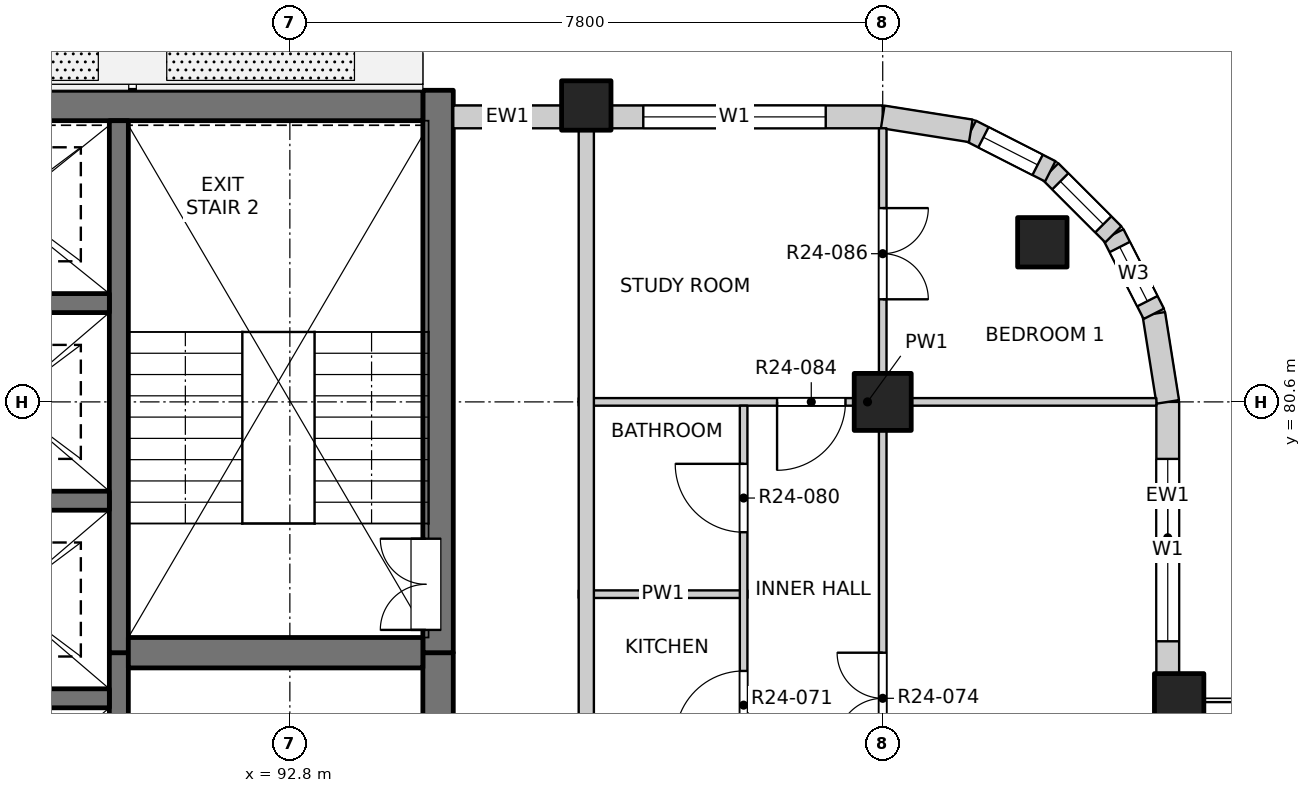
"""IFC4 building model, lengths in metres.
Left out: names, types, materials, properties, quantities, classifications, styles, units other than length and angle.
Written with IfcOpenShell. Run it as: python <this file> out.ifc"""

import sys

from ifc_helpers import new_model, si_unit, direction, frame, frame_2d, origin, origin_2d, place, context, subcontext, project, spatial, rectangle, extrude, element, fill, save


model = new_model("IFC4")
c1 = context("Model", 3, precision=1e-05, world=origin(), true_north=direction((0.0, 1.0)))
c2 = subcontext(c1, "Body", "Model", "MODEL_VIEW")
j1 = project(units=[si_unit("LENGTHUNIT", "METRE"), si_unit("PLANEANGLEUNIT", "RADIAN")], contexts=[c1])
p1 = place(None, origin())
s1 = spatial("IfcSite", under=j1, at=p1, CompositionType="ELEMENT")
p2 = place(p1, origin())
s2 = spatial("IfcBuilding", under=s1, at=p2, CompositionType="ELEMENT")
p3 = place(p2, frame((0.0, 0.0, 246.0)))
s3 = spatial("IfcBuildingStorey", under=s2, at=p3, CompositionType="ELEMENT", Elevation=246.0)
for number, where, z_axis, x_axis in (
    (1, (102.7, 82.7, -0.3), (0.0, 0.0, 1.0), (1.0, 0.0, 0.0)),
    (2, (104.5, 76.7, -0.3), (0.0, 0.0, 1.0), (1.0, 0.0, 0.0)),
    (3, (96.7, 84.5, -0.3), (0.0, 0.0, 1.0), (1.0, 0.0, 0.0)),
):
    element("IfcColumn", number, at=place(p3, frame(where, z_axis=z_axis, x_axis=x_axis)), inside=s3, PredefinedType="COLUMN", context=c2, shape_type="SweptSolid", body=[
        extrude(rectangle(XDim=0.65, YDim=0.65, at=origin_2d()), origin(), (0.0, 0.0, 1.0), 3.45),
    ])
p4 = place(p3, frame((100.6, 80.6, -0.3), z_axis=(0.0, 0.0, 1.0), x_axis=(1.0, 0.0, 0.0)))
e4 = element("IfcColumn", 4, at=p4, inside=s3, PredefinedType="COLUMN", context=c2, shape_type="SweptSolid", body=[
    extrude(rectangle(XDim=0.75, YDim=0.75, at=origin_2d()), origin(), (0.0, 0.0, 1.0), 3.45),
])
p5 = place(p3, frame((94.75, 61.95, -0.3), z_axis=(0.0, 0.0, 1.0), x_axis=(0.0, 1.0, 0.0)))
e5 = element("IfcWall", 5, at=p5, inside=s3, PredefinedType="SOLIDWALL", context=c2, shape_type="SweptSolid", body=[
    extrude(rectangle(XDim=15.35, YDim=0.4, at=frame_2d((7.675, 0.0))), origin(), (0.0, 0.0, 1.0), 3.45),
])
p6 = place(p5, frame((0.925, 0.0, 0.3)))
e6 = element("IfcOpeningElement", 6, at=p6, cuts=e5, PredefinedType="OPENING", context=c2, shape_type="SweptSolid", body=[
    extrude(rectangle(XDim=0.9, YDim=2.1, at=frame_2d((0.45, 1.05))), frame((0.0, 0.21, 0.0), z_axis=(0.0, -1.0, 0.0), x_axis=(1.0, 0.0, 0.0)), (0.0, 0.0, 1.0), 0.42),
])
p7 = place(p5, frame((3.8, 0.0, 0.3)))
e7 = element("IfcOpeningElement", 7, at=p7, cuts=e5, PredefinedType="OPENING", context=c2, shape_type="SweptSolid", body=[
    extrude(rectangle(XDim=0.9, YDim=2.1, at=frame_2d((0.45, 1.05))), frame((0.0, 0.21, 0.0), z_axis=(0.0, -1.0, 0.0), x_axis=(1.0, 0.0, 0.0)), (0.0, 0.0, 1.0), 0.42),
])
p8 = place(p5, frame((6.8, 0.0, 0.3)))
e8 = element("IfcOpeningElement", 8, at=p8, cuts=e5, PredefinedType="OPENING", context=c2, shape_type="SweptSolid", body=[
    extrude(rectangle(XDim=0.9, YDim=2.1, at=frame_2d((0.45, 1.05))), frame((0.0, 0.21, 0.0), z_axis=(0.0, -1.0, 0.0), x_axis=(1.0, 0.0, 0.0)), (0.0, 0.0, 1.0), 0.42),
])
p9 = place(p5, frame((9.8, 0.0, 0.3)))
e9 = element("IfcOpeningElement", 9, at=p9, cuts=e5, PredefinedType="OPENING", context=c2, shape_type="SweptSolid", body=[
    extrude(rectangle(XDim=0.9, YDim=2.1, at=frame_2d((0.45, 1.05))), frame((0.0, 0.21, 0.0), z_axis=(0.0, -1.0, 0.0), x_axis=(1.0, 0.0, 0.0)), (0.0, 0.0, 1.0), 0.42),
])
p10 = place(p5, frame((13.1, 0.0, 0.3)))
e10 = element("IfcOpeningElement", 10, at=p10, cuts=e5, PredefinedType="OPENING", context=c2, shape_type="SweptSolid", body=[
    extrude(rectangle(XDim=0.9, YDim=2.1, at=frame_2d((0.45, 1.05))), frame((0.0, 0.21, 0.0), z_axis=(0.0, -1.0, 0.0), x_axis=(1.0, 0.0, 0.0)), (0.0, 0.0, 1.0), 0.42),
])
p11 = place(p3, frame((94.75, 77.3, -0.3), z_axis=(0.0, 0.0, 1.0), x_axis=(0.0, 1.0, 0.0)))
e11 = element("IfcWall", 11, at=p11, inside=s3, PredefinedType="SOLIDWALL", context=c2, shape_type="SweptSolid", body=[
    extrude(rectangle(XDim=7.4, YDim=0.4, at=frame_2d((3.7, 0.0))), origin(), (0.0, 0.0, 1.0), 3.45),
])
p12 = place(p11, frame((0.3, 0.0, 0.3)))
e12 = element("IfcOpeningElement", 12, at=p12, cuts=e11, PredefinedType="OPENING", context=c2, shape_type="SweptSolid", body=[
    extrude(rectangle(XDim=1.2, YDim=2.1, at=frame_2d((0.6, 1.05))), frame((0.0, 0.21, 0.0), z_axis=(0.0, -1.0, 0.0), x_axis=(1.0, 0.0, 0.0)), (0.0, 0.0, 1.0), 0.42),
])
p13 = place(p3, frame((75.45, 84.5, -0.3), z_axis=(0.0, 0.0, 1.0), x_axis=(1.0, 0.0, 0.0)))
e13 = element("IfcWall", 13, at=p13, inside=s3, PredefinedType="SOLIDWALL", context=c2, shape_type="SweptSolid", body=[
    extrude(rectangle(XDim=19.1, YDim=0.4, at=frame_2d((9.55, 0.0))), origin(), (0.0, 0.0, 1.0), 3.45),
])
p14 = place(p3, frame((90.55, 61.95, -0.3), z_axis=(0.0, 0.0, 1.0), x_axis=(0.0, 1.0, 0.0)))
e14 = element("IfcWall", 14, at=p14, inside=s3, PredefinedType="SOLIDWALL", context=c2, shape_type="SweptSolid", body=[
    extrude(rectangle(XDim=15.35, YDim=0.25, at=frame_2d((7.675, 0.0))), origin(), (0.0, 0.0, 1.0), 3.45),
])
p15 = place(p3, frame((90.55, 77.3, -0.3), z_axis=(0.0, 0.0, 1.0), x_axis=(0.0, 1.0, 0.0)))
e15 = element("IfcWall", 15, at=p15, inside=s3, PredefinedType="SOLIDWALL", context=c2, shape_type="SweptSolid", body=[
    extrude(rectangle(XDim=7.0, YDim=0.25, at=frame_2d((3.5, 0.0))), origin(), (0.0, 0.0, 1.0), 3.45),
])
for number, where, z_axis, x_axis in (
    (16, (87.425, 76.7, -0.3), (0.0, 0.0, 1.0), (1.0, 0.0, 0.0)),
    (17, (87.425, 79.3, -0.3), (0.0, 0.0, 1.0), (1.0, 0.0, 0.0)),
    (18, (87.425, 81.9, -0.3), (0.0, 0.0, 1.0), (1.0, 0.0, 0.0)),
):
    element("IfcWall", number, at=place(p3, frame(where, z_axis=z_axis, x_axis=x_axis)), inside=s3, PredefinedType="SOLIDWALL", context=c2, shape_type="SweptSolid", body=[
        extrude(rectangle(XDim=3.0, YDim=0.25, at=frame_2d((1.5, 0.0))), origin(), (0.0, 0.0, 1.0), 3.45),
    ])
p16 = place(p3, frame((90.675, 77.3, -0.3), z_axis=(0.0, 0.0, 1.0), x_axis=(1.0, 0.0, 0.0)))
e19 = element("IfcWall", 19, at=p16, inside=s3, PredefinedType="SOLIDWALL", context=c2, shape_type="SweptSolid", body=[
    extrude(rectangle(XDim=3.875, YDim=0.4, at=frame_2d((1.938, 0.0))), origin(), (0.0, 0.0, 1.0), 3.45),
])
p17 = place(p3, frame((104.35, 77.025, 0.0), z_axis=(0.0, 0.0, 1.0), x_axis=(0.0, 1.0, 0.0)))
e20 = element("IfcWall", 20, at=p17, inside=s3, PredefinedType="SOLIDWALL", context=c2, shape_type="SweptSolid", body=[
    extrude(rectangle(XDim=3.575, YDim=0.3, at=frame_2d((1.788, 0.0))), origin(), (0.0, 0.0, 1.0), 2.7),
])
p18 = place(p17, frame((0.425, 0.0, 0.9)))
e21 = element("IfcOpeningElement", 21, at=p18, cuts=e20, PredefinedType="OPENING", context=c2, shape_type="SweptSolid", body=[
    extrude(rectangle(XDim=2.4, YDim=1.8, at=frame_2d((1.2, 0.9))), frame((0.0, 0.16, 0.0), z_axis=(0.0, -1.0, 0.0), x_axis=(1.0, 0.0, 0.0)), (0.0, 0.0, 1.0), 0.32),
])
p19 = place(p3, frame((94.95, 84.35, 0.0), z_axis=(0.0, 0.0, 1.0), x_axis=(1.0, 0.0, 0.0)))
e22 = element("IfcWall", 22, at=p19, inside=s3, PredefinedType="SOLIDWALL", context=c2, shape_type="SweptSolid", body=[
    extrude(rectangle(XDim=1.425, YDim=0.3, at=frame_2d((0.712, 0.0))), origin(), (0.0, 0.0, 1.0), 2.7),
])
p20 = place(p3, frame((97.025, 84.35, 0.0), z_axis=(0.0, 0.0, 1.0), x_axis=(1.0, 0.0, 0.0)))
e23 = element("IfcWall", 23, at=p20, inside=s3, PredefinedType="SOLIDWALL", context=c2, shape_type="SweptSolid", body=[
    extrude(rectangle(XDim=3.575, YDim=0.3, at=frame_2d((1.788, 0.0))), origin(), (0.0, 0.0, 1.0), 2.7),
])
p21 = place(p20, frame((0.425, 0.0, 0.9)))
e24 = element("IfcOpeningElement", 24, at=p21, cuts=e23, PredefinedType="OPENING", context=c2, shape_type="SweptSolid", body=[
    extrude(rectangle(XDim=2.4, YDim=1.8, at=frame_2d((1.2, 0.9))), frame((0.0, 0.16, 0.0), z_axis=(0.0, -1.0, 0.0), x_axis=(1.0, 0.0, 0.0)), (0.0, 0.0, 1.0), 0.32),
])
p22 = place(p3, frame((104.35, 80.6, 0.0), z_axis=(0.0, 0.0, 1.0), x_axis=(-0.156496880861, 0.987678452879, 0.0)))
e25 = element("IfcWall", 25, at=p22, inside=s3, PredefinedType="SOLIDWALL", context=c2, shape_type="SweptSolid", body=[
    extrude(rectangle(XDim=1.173, YDim=0.3, at=frame_2d((0.586, 0.0))), origin(), (0.0, 0.0, 1.0), 2.7),
])
p23 = place(p3, frame((104.167, 81.759, 0.0), z_axis=(0.0, 0.0, 1.0), x_axis=(-0.454025524128, 0.890988677504, 0.0)))
e26 = element("IfcWall", 26, at=p23, inside=s3, PredefinedType="SOLIDWALL", context=c2, shape_type="SweptSolid", body=[
    extrude(rectangle(XDim=1.173, YDim=0.3, at=frame_2d((0.587, 0.0))), origin(), (0.0, 0.0, 1.0), 2.7),
])
p24 = place(p23, frame((0.187, 0.0, 0.9)))
e27 = element("IfcOpeningElement", 27, at=p24, cuts=e26, PredefinedType="OPENING", context=c2, shape_type="SweptSolid", body=[
    extrude(rectangle(XDim=0.8, YDim=1.2, at=frame_2d((0.4, 0.6))), frame((0.0, 0.16, 0.0), z_axis=(0.0, -1.0, 0.0), x_axis=(1.0, 0.0, 0.0)), (0.0, 0.0, 1.0), 0.32),
])
p25 = place(p3, frame((103.634, 82.804, 0.0), z_axis=(0.0, 0.0, 1.0), x_axis=(-0.707106781187, 0.707106781187, 0.0)))
e28 = element("IfcWall", 28, at=p25, inside=s3, PredefinedType="SOLIDWALL", context=c2, shape_type="SweptSolid", body=[
    extrude(rectangle(XDim=1.173, YDim=0.3, at=frame_2d((0.586, 0.0))), origin(), (0.0, 0.0, 1.0), 2.7),
])
p26 = place(p25, frame((0.187, 0.0, 0.9)))
e29 = element("IfcOpeningElement", 29, at=p26, cuts=e28, PredefinedType="OPENING", context=c2, shape_type="SweptSolid", body=[
    extrude(rectangle(XDim=0.8, YDim=1.2, at=frame_2d((0.4, 0.6))), frame((0.0, 0.16, 0.0), z_axis=(0.0, -1.0, 0.0), x_axis=(1.0, 0.0, 0.0)), (0.0, 0.0, 1.0), 0.32),
])
p27 = place(p3, frame((102.804, 83.634, 0.0), z_axis=(0.0, 0.0, 1.0), x_axis=(-0.890988677504, 0.454025524128, 0.0)))
e30 = element("IfcWall", 30, at=p27, inside=s3, PredefinedType="SOLIDWALL", context=c2, shape_type="SweptSolid", body=[
    extrude(rectangle(XDim=1.173, YDim=0.3, at=frame_2d((0.587, 0.0))), origin(), (0.0, 0.0, 1.0), 2.7),
])
p28 = place(p27, frame((0.187, 0.0, 0.9)))
e31 = element("IfcOpeningElement", 31, at=p28, cuts=e30, PredefinedType="OPENING", context=c2, shape_type="SweptSolid", body=[
    extrude(rectangle(XDim=0.8, YDim=1.2, at=frame_2d((0.4, 0.6))), frame((0.0, 0.16, 0.0), z_axis=(0.0, -1.0, 0.0), x_axis=(1.0, 0.0, 0.0)), (0.0, 0.0, 1.0), 0.32),
])
p29 = place(p3, frame((101.759, 84.167, 0.0), z_axis=(0.0, 0.0, 1.0), x_axis=(-0.987678452879, 0.156496880861, 0.0)))
e32 = element("IfcWall", 32, at=p29, inside=s3, PredefinedType="SOLIDWALL", context=c2, shape_type="SweptSolid", body=[
    extrude(rectangle(XDim=1.173, YDim=0.3, at=frame_2d((0.586, 0.0))), origin(), (0.0, 0.0, 1.0), 2.7),
])
p30 = place(p3, frame((96.6, 78.07, 0.0), z_axis=(0.0, 0.0, 1.0), x_axis=(1.0, 0.0, 0.0)))
e33 = element("IfcWall", 33, at=p30, inside=s3, PredefinedType="PARTITIONING", context=c2, shape_type="SweptSolid", body=[
    extrude(rectangle(XDim=2.22, YDim=0.1, at=frame_2d((1.11, 0.0))), origin(), (0.0, 0.0, 1.0), 3.15),
])
p31 = place(p3, frame((96.6, 80.6, 0.0), z_axis=(0.0, 0.0, 1.0), x_axis=(1.0, 0.0, 0.0)))
e34 = element("IfcWall", 34, at=p31, inside=s3, PredefinedType="PARTITIONING", context=c2, shape_type="SweptSolid", body=[
    extrude(rectangle(XDim=7.6, YDim=0.1, at=frame_2d((3.8, 0.0))), origin(), (0.0, 0.0, 1.0), 3.15),
])
p32 = place(p31, frame((2.61, 0.0, 0.0)))
e35 = element("IfcOpeningElement", 35, at=p32, cuts=e34, PredefinedType="OPENING", context=c2, shape_type="SweptSolid", body=[
    extrude(rectangle(XDim=0.9, YDim=2.1, at=frame_2d((0.45, 1.05))), frame((0.0, 0.06, 0.0), z_axis=(0.0, -1.0, 0.0), x_axis=(1.0, 0.0, 0.0)), (0.0, 0.0, 1.0), 0.12),
])
p33 = place(p3, frame((96.7, 49.5, 0.0), z_axis=(0.0, 0.0, 1.0), x_axis=(0.0, 1.0, 0.0)))
e36 = element("IfcWall", 36, at=p33, inside=s3, PredefinedType="PARTITIONING", context=c2, shape_type="SweptSolid", body=[
    extrude(rectangle(XDim=34.7, YDim=0.2, at=frame_2d((17.35, 0.0))), origin(), (0.0, 0.0, 1.0), 3.15),
])
p34 = place(p33, frame((3.075, 0.0, 0.0)))
e37 = element("IfcOpeningElement", 37, at=p34, cuts=e36, PredefinedType="OPENING", context=c2, shape_type="SweptSolid", body=[
    extrude(rectangle(XDim=1.0, YDim=2.1, at=frame_2d((0.5, 1.05))), frame((0.0, 0.11, 0.0), z_axis=(0.0, -1.0, 0.0), x_axis=(1.0, 0.0, 0.0)), (0.0, 0.0, 1.0), 0.22),
])
p35 = place(p33, frame((18.425, 0.0, 0.0)))
e38 = element("IfcOpeningElement", 38, at=p35, cuts=e36, PredefinedType="OPENING", context=c2, shape_type="SweptSolid", body=[
    extrude(rectangle(XDim=1.0, YDim=2.1, at=frame_2d((0.5, 1.05))), frame((0.0, 0.11, 0.0), z_axis=(0.0, -1.0, 0.0), x_axis=(1.0, 0.0, 0.0)), (0.0, 0.0, 1.0), 0.22),
])
p36 = place(p33, frame((25.825, 0.0, 0.0)))
e39 = element("IfcOpeningElement", 39, at=p36, cuts=e36, PredefinedType="OPENING", context=c2, shape_type="SweptSolid", body=[
    extrude(rectangle(XDim=1.0, YDim=2.1, at=frame_2d((0.5, 1.05))), frame((0.0, 0.11, 0.0), z_axis=(0.0, -1.0, 0.0), x_axis=(1.0, 0.0, 0.0)), (0.0, 0.0, 1.0), 0.22),
])
p37 = place(p3, frame((98.77, 75.2, 0.0), z_axis=(0.0, 0.0, 1.0), x_axis=(0.0, 1.0, 0.0)))
e40 = element("IfcWall", 40, at=p37, inside=s3, PredefinedType="PARTITIONING", context=c2, shape_type="SweptSolid", body=[
    extrude(rectangle(XDim=5.35, YDim=0.1, at=frame_2d((2.675, 0.0))), origin(), (0.0, 0.0, 1.0), 3.15),
])
p38 = place(p37, frame((0.96, 0.0, 0.0)))
e41 = element("IfcOpeningElement", 41, at=p38, cuts=e40, PredefinedType="OPENING", context=c2, shape_type="SweptSolid", body=[
    extrude(rectangle(XDim=0.9, YDim=2.1, at=frame_2d((0.45, 1.05))), frame((0.0, 0.06, 0.0), z_axis=(0.0, -1.0, 0.0), x_axis=(1.0, 0.0, 0.0)), (0.0, 0.0, 1.0), 0.12),
])
p39 = place(p37, frame((3.685, 0.0, 0.0)))
e42 = element("IfcOpeningElement", 42, at=p39, cuts=e40, PredefinedType="OPENING", context=c2, shape_type="SweptSolid", body=[
    extrude(rectangle(XDim=0.9, YDim=2.1, at=frame_2d((0.45, 1.05))), frame((0.0, 0.06, 0.0), z_axis=(0.0, -1.0, 0.0), x_axis=(1.0, 0.0, 0.0)), (0.0, 0.0, 1.0), 0.12),
])
p40 = place(p3, frame((100.6, 45.8, 0.0), z_axis=(0.0, 0.0, 1.0), x_axis=(0.0, 1.0, 0.0)))
e43 = element("IfcWall", 43, at=p40, inside=s3, PredefinedType="PARTITIONING", context=c2, shape_type="SweptSolid", body=[
    extrude(rectangle(XDim=38.4, YDim=0.1, at=frame_2d((19.2, 0.0))), origin(), (0.0, 0.0, 1.0), 3.15),
])
p41 = place(p40, frame((1.05, 0.0, 0.0)))
e44 = element("IfcOpeningElement", 44, at=p41, cuts=e43, PredefinedType="OPENING", context=c2, shape_type="SweptSolid", body=[
    extrude(rectangle(XDim=1.2, YDim=2.1, at=frame_2d((0.6, 1.05))), frame((0.0, 0.06, 0.0), z_axis=(0.0, -1.0, 0.0), x_axis=(1.0, 0.0, 0.0)), (0.0, 0.0, 1.0), 0.12),
])
p42 = place(p40, frame((6.9, 0.0, 0.0)))
e45 = element("IfcOpeningElement", 45, at=p42, cuts=e43, PredefinedType="OPENING", context=c2, shape_type="SweptSolid", body=[
    extrude(rectangle(XDim=1.2, YDim=2.1, at=frame_2d((0.6, 1.05))), frame((0.0, 0.06, 0.0), z_axis=(0.0, -1.0, 0.0), x_axis=(1.0, 0.0, 0.0)), (0.0, 0.0, 1.0), 0.12),
])
p43 = place(p40, frame((12.9, 0.0, 0.0)))
e46 = element("IfcOpeningElement", 46, at=p43, cuts=e43, PredefinedType="OPENING", context=c2, shape_type="SweptSolid", body=[
    extrude(rectangle(XDim=0.9, YDim=2.1, at=frame_2d((0.45, 1.05))), frame((0.0, 0.06, 0.0), z_axis=(0.0, -1.0, 0.0), x_axis=(1.0, 0.0, 0.0)), (0.0, 0.0, 1.0), 0.12),
])
p44 = place(p40, frame((16.8, 0.0, 0.0)))
e47 = element("IfcOpeningElement", 47, at=p44, cuts=e43, PredefinedType="OPENING", context=c2, shape_type="SweptSolid", body=[
    extrude(rectangle(XDim=0.9, YDim=2.1, at=frame_2d((0.45, 1.05))), frame((0.0, 0.06, 0.0), z_axis=(0.0, -1.0, 0.0), x_axis=(1.0, 0.0, 0.0)), (0.0, 0.0, 1.0), 0.12),
])
p45 = place(p40, frame((20.7, 0.0, 0.0)))
e48 = element("IfcOpeningElement", 48, at=p45, cuts=e43, PredefinedType="OPENING", context=c2, shape_type="SweptSolid", body=[
    extrude(rectangle(XDim=0.9, YDim=2.1, at=frame_2d((0.45, 1.05))), frame((0.0, 0.06, 0.0), z_axis=(0.0, -1.0, 0.0), x_axis=(1.0, 0.0, 0.0)), (0.0, 0.0, 1.0), 0.12),
])
p46 = place(p40, frame((24.6, 0.0, 0.0)))
e49 = element("IfcOpeningElement", 49, at=p46, cuts=e43, PredefinedType="OPENING", context=c2, shape_type="SweptSolid", body=[
    extrude(rectangle(XDim=0.9, YDim=2.1, at=frame_2d((0.45, 1.05))), frame((0.0, 0.06, 0.0), z_axis=(0.0, -1.0, 0.0), x_axis=(1.0, 0.0, 0.0)), (0.0, 0.0, 1.0), 0.12),
])
p47 = place(p40, frame((30.3, 0.0, 0.0)))
e50 = element("IfcOpeningElement", 50, at=p47, cuts=e43, PredefinedType="OPENING", context=c2, shape_type="SweptSolid", body=[
    extrude(rectangle(XDim=1.2, YDim=2.1, at=frame_2d((0.6, 1.05))), frame((0.0, 0.06, 0.0), z_axis=(0.0, -1.0, 0.0), x_axis=(1.0, 0.0, 0.0)), (0.0, 0.0, 1.0), 0.12),
])
p48 = place(p40, frame((36.15, 0.0, 0.0)))
e51 = element("IfcOpeningElement", 51, at=p48, cuts=e43, PredefinedType="OPENING", context=c2, shape_type="SweptSolid", body=[
    extrude(rectangle(XDim=1.2, YDim=2.1, at=frame_2d((0.6, 1.05))), frame((0.0, 0.06, 0.0), z_axis=(0.0, -1.0, 0.0), x_axis=(1.0, 0.0, 0.0)), (0.0, 0.0, 1.0), 0.12),
])
p49 = place(p18, origin())
e52 = element("IfcWindow", 52, at=p49, inside=s3, PartitioningType="DOUBLE_PANEL_VERTICAL", PredefinedType="WINDOW", context=c2, shape_type="SweptSolid", body=[
    extrude(rectangle(XDim=2.4, YDim=1.8, at=frame_2d((1.2, 0.9))), frame((0.0, 0.03, 0.0), z_axis=(0.0, -1.0, 0.0), x_axis=(1.0, 0.0, 0.0)), (0.0, 0.0, 1.0), 0.06),
])
fill(e21, e52)
p50 = place(p21, origin())
e53 = element("IfcWindow", 53, at=p50, inside=s3, PartitioningType="DOUBLE_PANEL_VERTICAL", PredefinedType="WINDOW", context=c2, shape_type="SweptSolid", body=[
    extrude(rectangle(XDim=2.4, YDim=1.8, at=frame_2d((1.2, 0.9))), frame((0.0, 0.03, 0.0), z_axis=(0.0, -1.0, 0.0), x_axis=(1.0, 0.0, 0.0)), (0.0, 0.0, 1.0), 0.06),
])
fill(e24, e53)
p51 = place(p24, origin())
e54 = element("IfcWindow", 54, at=p51, inside=s3, PartitioningType="SINGLE_PANEL", PredefinedType="WINDOW", context=c2, shape_type="SweptSolid", body=[
    extrude(rectangle(XDim=0.8, YDim=1.2, at=frame_2d((0.4, 0.6))), frame((0.0, 0.03, 0.0), z_axis=(0.0, -1.0, 0.0), x_axis=(1.0, 0.0, 0.0)), (0.0, 0.0, 1.0), 0.06),
])
fill(e27, e54)
p52 = place(p26, origin())
e55 = element("IfcWindow", 55, at=p52, inside=s3, PartitioningType="SINGLE_PANEL", PredefinedType="WINDOW", context=c2, shape_type="SweptSolid", body=[
    extrude(rectangle(XDim=0.8, YDim=1.2, at=frame_2d((0.4, 0.6))), frame((0.0, 0.03, 0.0), z_axis=(0.0, -1.0, 0.0), x_axis=(1.0, 0.0, 0.0)), (0.0, 0.0, 1.0), 0.06),
])
fill(e29, e55)
p53 = place(p28, origin())
e56 = element("IfcWindow", 56, at=p53, inside=s3, PartitioningType="SINGLE_PANEL", PredefinedType="WINDOW", context=c2, shape_type="SweptSolid", body=[
    extrude(rectangle(XDim=0.8, YDim=1.2, at=frame_2d((0.4, 0.6))), frame((0.0, 0.03, 0.0), z_axis=(0.0, -1.0, 0.0), x_axis=(1.0, 0.0, 0.0)), (0.0, 0.0, 1.0), 0.06),
])
fill(e31, e56)
p54 = place(p38, origin())
e57 = element("IfcDoor", 57, at=p54, inside=s3, OperationType="SINGLE_SWING_LEFT", PredefinedType="DOOR", context=c2, shape_type="SweptSolid", body=[
    extrude(rectangle(XDim=0.9, YDim=2.1, at=frame_2d((0.45, 1.05))), frame((0.0, 0.025, 0.0), z_axis=(0.0, -1.0, 0.0), x_axis=(1.0, 0.0, 0.0)), (0.0, 0.0, 1.0), 0.05),
])
fill(e41, e57)
p55 = place(p47, origin())
e58 = element("IfcDoor", 58, at=p55, inside=s3, OperationType="DOUBLE_DOOR_SINGLE_SWING", PredefinedType="DOOR", context=c2, shape_type="SweptSolid", body=[
    extrude(rectangle(XDim=1.2, YDim=2.1, at=frame_2d((0.6, 1.05))), frame((0.0, 0.025, 0.0), z_axis=(0.0, -1.0, 0.0), x_axis=(1.0, 0.0, 0.0)), (0.0, 0.0, 1.0), 0.05),
])
fill(e50, e58)
p56 = place(p12, origin())
e59 = element("IfcDoor", 59, at=p56, inside=s3, OperationType="DOUBLE_DOOR_SINGLE_SWING", PredefinedType="DOOR", context=c2, shape_type="SweptSolid", body=[
    extrude(rectangle(XDim=1.2, YDim=2.1, at=frame_2d((0.6, 1.05))), frame((0.0, 0.185, 0.0), z_axis=(0.0, -1.0, 0.0), x_axis=(1.0, 0.0, 0.0)), (0.0, 0.0, 1.0), 0.05),
])
fill(e12, e59)
p57 = place(p39, origin())
e60 = element("IfcDoor", 60, at=p57, inside=s3, OperationType="SINGLE_SWING_RIGHT", PredefinedType="DOOR", context=c2, shape_type="SweptSolid", body=[
    extrude(rectangle(XDim=0.9, YDim=2.1, at=frame_2d((0.45, 1.05))), frame((0.0, 0.025, 0.0), z_axis=(0.0, -1.0, 0.0), x_axis=(1.0, 0.0, 0.0)), (0.0, 0.0, 1.0), 0.05),
])
fill(e42, e60)
p58 = place(p32, origin())
e61 = element("IfcDoor", 61, at=p58, inside=s3, OperationType="SINGLE_SWING_RIGHT", PredefinedType="DOOR", context=c2, shape_type="SweptSolid", body=[
    extrude(rectangle(XDim=0.9, YDim=2.1, at=frame_2d((0.45, 1.05))), frame((0.0, 0.025, 0.0), z_axis=(0.0, -1.0, 0.0), x_axis=(1.0, 0.0, 0.0)), (0.0, 0.0, 1.0), 0.05),
])
fill(e35, e61)
p59 = place(p48, origin())
e62 = element("IfcDoor", 62, at=p59, inside=s3, OperationType="DOUBLE_DOOR_SINGLE_SWING", PredefinedType="DOOR", context=c2, shape_type="SweptSolid", body=[
    extrude(rectangle(XDim=1.2, YDim=2.1, at=frame_2d((0.6, 1.05))), frame((0.0, 0.025, 0.0), z_axis=(0.0, -1.0, 0.0), x_axis=(1.0, 0.0, 0.0)), (0.0, 0.0, 1.0), 0.05),
])
fill(e51, e62)
save(model, sys.argv[1])
